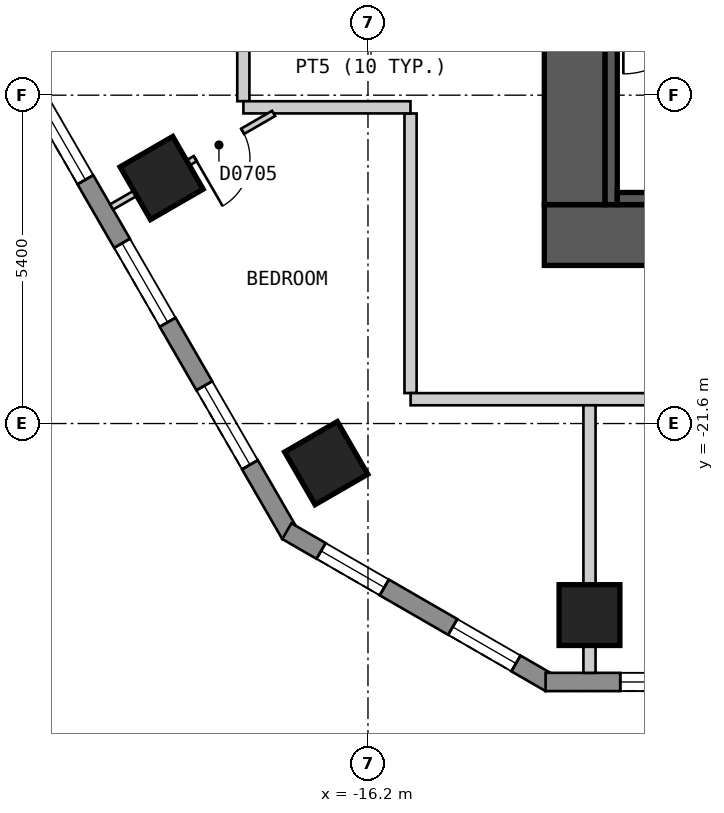
"""IFC4 building model, lengths in metres.
Left out: names, types, materials, properties, quantities, classifications, styles, units other than length and angle.
Written with IfcOpenShell. Run it as: python <this file> out.ifc"""

import sys

from ifc_helpers import new_model, si_unit, direction, frame, frame_2d, origin, origin_2d, place, context, subcontext, project, spatial, polyline, rectangle, outline, extrude, element, fill, save


model = new_model("IFC4")
c1 = context("Model", 3, precision=1e-05, world=origin(), true_north=direction((0.0, 1.0)))
c2 = subcontext(c1, "Body", "Model", "MODEL_VIEW")
j1 = project(units=[si_unit("LENGTHUNIT", "METRE"), si_unit("PLANEANGLEUNIT", "RADIAN")], contexts=[c1])
p1 = place(None, origin())
s1 = spatial("IfcSite", under=j1, at=p1, CompositionType="ELEMENT")
p2 = place(p1, origin())
s2 = spatial("IfcBuilding", under=s1, at=p2, CompositionType="ELEMENT")
p3 = place(p2, frame((0.0, 0.0, 105.0)))
s3 = spatial("IfcBuildingStorey", under=s2, at=p3, CompositionType="ELEMENT", Elevation=105.0)
for number, where, z_axis, x_axis in (
    (1, (-19.594, -17.563, 0.0), (0.0, 0.0, 1.0), (0.5, -0.866, 0.0)),
    (2, (-16.887, -22.251, 0.0), (0.0, 0.0, 1.0), (0.5, -0.866, 0.0)),
    (3, (-12.557, -24.75, 0.0), (0.0, 0.0, 1.0), (1.0, 0.0, 0.0)),
):
    element("IfcColumn", number, at=place(p3, frame(where, z_axis=z_axis, x_axis=x_axis)), inside=s3, PredefinedType="COLUMN", context=c2, shape_type="SweptSolid", body=[
        extrude(rectangle(XDim=1.0, YDim=1.0, at=origin_2d()), origin(), (0.0, 0.0, 1.0), 3.0),
    ])
p4 = place(p3, frame((-13.3, -18.5, 0.0), z_axis=(0.0, 0.0, 1.0), x_axis=(1.0, 0.0, 0.0)))
e4 = element("IfcWall", 4, at=p4, inside=s3, PredefinedType="SHEAR", context=c2, shape_type="SweptSolid", body=[
    extrude(rectangle(XDim=26.6, YDim=1.0, at=frame_2d((13.3, 0.0))), origin(), (0.0, 0.0, 1.0), 2.6),
])
p5 = place(p3, frame((-12.8, -18.0, 0.0), z_axis=(0.0, 0.0, 1.0), x_axis=(0.0, 1.0, 0.0)))
e5 = element("IfcWall", 5, at=p5, inside=s3, PredefinedType="SHEAR", context=c2, shape_type="SweptSolid", body=[
    extrude(rectangle(XDim=12.0, YDim=1.0, at=frame_2d((6.0, 0.0))), origin(), (0.0, 0.0, 1.0), 2.6),
])
p6 = place(p5, frame((3.8, 0.0, 0.0)))
e6 = element("IfcOpeningElement", 6, at=p6, cuts=e5, PredefinedType="OPENING", context=c2, shape_type="SweptSolid", body=[
    extrude(rectangle(XDim=1.2, YDim=2.1, at=frame_2d((0.6, 1.05))), frame((0.0, 0.51, 0.0), z_axis=(0.0, -1.0, 0.0), x_axis=(1.0, 0.0, 0.0)), (0.0, 0.0, 1.0), 1.02),
])
p7 = place(p3, frame((-29.027, -3.425, 0.0), z_axis=(0.0, 0.0, 1.0), x_axis=(0.500035407905, -0.866004960056, 0.0)))
e7 = element("IfcWall", 7, at=p7, inside=s3, PredefinedType="SOLIDWALL", context=c2, shape_type="SweptSolid", body=[
    extrude(outline(polyline([(0.0, -0.15), (23.094, -0.15), (23.014, 0.15), (0.08, 0.15), (0.0, -0.15)])), origin(), (0.0, 0.0, 1.0), 2.6),
])
p8 = place(p7, frame((1.324, 0.0, 0.15)))
e8 = element("IfcOpeningElement", 8, at=p8, cuts=e7, PredefinedType="OPENING", context=c2, shape_type="SweptSolid", body=[
    extrude(rectangle(XDim=1.5, YDim=2.1, at=frame_2d((0.75, 1.05))), frame((0.0, 0.16, 0.0), z_axis=(0.0, -1.0, 0.0), x_axis=(1.0, 0.0, 0.0)), (0.0, 0.0, 1.0), 0.32),
])
p9 = place(p7, frame((4.031, 0.0, 0.15)))
e9 = element("IfcOpeningElement", 9, at=p9, cuts=e7, PredefinedType="OPENING", context=c2, shape_type="SweptSolid", body=[
    extrude(rectangle(XDim=1.5, YDim=2.1, at=frame_2d((0.75, 1.05))), frame((0.0, 0.16, 0.0), z_axis=(0.0, -1.0, 0.0), x_axis=(1.0, 0.0, 0.0)), (0.0, 0.0, 1.0), 0.32),
])
p10 = place(p7, frame((6.737, 0.0, 0.15)))
e10 = element("IfcOpeningElement", 10, at=p10, cuts=e7, PredefinedType="OPENING", context=c2, shape_type="SweptSolid", body=[
    extrude(rectangle(XDim=1.5, YDim=2.1, at=frame_2d((0.75, 1.05))), frame((0.0, 0.16, 0.0), z_axis=(0.0, -1.0, 0.0), x_axis=(1.0, 0.0, 0.0)), (0.0, 0.0, 1.0), 0.32),
])
p11 = place(p7, frame((9.444, 0.0, 0.15)))
e11 = element("IfcOpeningElement", 11, at=p11, cuts=e7, PredefinedType="OPENING", context=c2, shape_type="SweptSolid", body=[
    extrude(rectangle(XDim=1.5, YDim=2.1, at=frame_2d((0.75, 1.05))), frame((0.0, 0.16, 0.0), z_axis=(0.0, -1.0, 0.0), x_axis=(1.0, 0.0, 0.0)), (0.0, 0.0, 1.0), 0.32),
])
p12 = place(p7, frame((12.151, 0.0, 0.15)))
e12 = element("IfcOpeningElement", 12, at=p12, cuts=e7, PredefinedType="OPENING", context=c2, shape_type="SweptSolid", body=[
    extrude(rectangle(XDim=1.5, YDim=2.1, at=frame_2d((0.75, 1.05))), frame((0.0, 0.16, 0.0), z_axis=(0.0, -1.0, 0.0), x_axis=(1.0, 0.0, 0.0)), (0.0, 0.0, 1.0), 0.32),
])
p13 = place(p7, frame((14.857, 0.0, 0.15)))
e13 = element("IfcOpeningElement", 13, at=p13, cuts=e7, PredefinedType="OPENING", context=c2, shape_type="SweptSolid", body=[
    extrude(rectangle(XDim=1.5, YDim=2.1, at=frame_2d((0.75, 1.05))), frame((0.0, 0.16, 0.0), z_axis=(0.0, -1.0, 0.0), x_axis=(1.0, 0.0, 0.0)), (0.0, 0.0, 1.0), 0.32),
])
p14 = place(p7, frame((17.564, 0.0, 0.15)))
e14 = element("IfcOpeningElement", 14, at=p14, cuts=e7, PredefinedType="OPENING", context=c2, shape_type="SweptSolid", body=[
    extrude(rectangle(XDim=1.5, YDim=2.1, at=frame_2d((0.75, 1.05))), frame((0.0, 0.16, 0.0), z_axis=(0.0, -1.0, 0.0), x_axis=(1.0, 0.0, 0.0)), (0.0, 0.0, 1.0), 0.32),
])
p15 = place(p7, frame((20.27, 0.0, 0.15)))
e15 = element("IfcOpeningElement", 15, at=p15, cuts=e7, PredefinedType="OPENING", context=c2, shape_type="SweptSolid", body=[
    extrude(rectangle(XDim=1.5, YDim=2.1, at=frame_2d((0.75, 1.05))), frame((0.0, 0.16, 0.0), z_axis=(0.0, -1.0, 0.0), x_axis=(1.0, 0.0, 0.0)), (0.0, 0.0, 1.0), 0.32),
])
p16 = place(p3, frame((-17.534, -23.37, 0.0), z_axis=(0.0, 0.0, 1.0), x_axis=(0.866010750942, -0.50002537861, 0.0)))
e16 = element("IfcWall", 16, at=p16, inside=s3, PredefinedType="SOLIDWALL", context=c2, shape_type="SweptSolid", body=[
    extrude(outline(polyline([(0.0, -0.15), (5.0, -0.15), (4.919, 0.15), (0.08, 0.15), (0.0, -0.15)])), origin(), (0.0, 0.0, 1.0), 2.6),
])
p17 = place(p16, frame((0.65, 0.0, 0.15)))
e17 = element("IfcOpeningElement", 17, at=p17, cuts=e16, PredefinedType="OPENING", context=c2, shape_type="SweptSolid", body=[
    extrude(rectangle(XDim=1.2, YDim=2.1, at=frame_2d((0.6, 1.05))), frame((0.0, 0.16, 0.0), z_axis=(0.0, -1.0, 0.0), x_axis=(1.0, 0.0, 0.0)), (0.0, 0.0, 1.0), 0.32),
])
p18 = place(p16, frame((3.15, 0.0, 0.15)))
e18 = element("IfcOpeningElement", 18, at=p18, cuts=e16, PredefinedType="OPENING", context=c2, shape_type="SweptSolid", body=[
    extrude(rectangle(XDim=1.2, YDim=2.1, at=frame_2d((0.6, 1.05))), frame((0.0, 0.16, 0.0), z_axis=(0.0, -1.0, 0.0), x_axis=(1.0, 0.0, 0.0)), (0.0, 0.0, 1.0), 0.32),
])
p19 = place(p3, frame((-13.279, -25.85, 0.0), z_axis=(0.0, 0.0, 1.0), x_axis=(1.0, 0.0, 0.0)))
e19 = element("IfcWall", 19, at=p19, inside=s3, PredefinedType="SOLIDWALL", context=c2, shape_type="SweptSolid", body=[
    extrude(outline(polyline([(0.0, -0.15), (26.558, -0.15), (26.478, 0.15), (0.08, 0.15), (0.0, -0.15)])), origin(), (0.0, 0.0, 1.0), 2.6),
])
p20 = place(p19, frame((1.228, 0.0, 0.15)))
e20 = element("IfcOpeningElement", 20, at=p20, cuts=e19, PredefinedType="OPENING", context=c2, shape_type="SweptSolid", body=[
    extrude(rectangle(XDim=1.5, YDim=2.1, at=frame_2d((0.75, 1.05))), frame((0.0, 0.16, 0.0), z_axis=(0.0, -1.0, 0.0), x_axis=(1.0, 0.0, 0.0)), (0.0, 0.0, 1.0), 0.32),
])
p21 = place(p19, frame((3.739, 0.0, 0.15)))
e21 = element("IfcOpeningElement", 21, at=p21, cuts=e19, PredefinedType="OPENING", context=c2, shape_type="SweptSolid", body=[
    extrude(rectangle(XDim=1.5, YDim=2.1, at=frame_2d((0.75, 1.05))), frame((0.0, 0.16, 0.0), z_axis=(0.0, -1.0, 0.0), x_axis=(1.0, 0.0, 0.0)), (0.0, 0.0, 1.0), 0.32),
])
p22 = place(p19, frame((6.251, 0.0, 0.15)))
e22 = element("IfcOpeningElement", 22, at=p22, cuts=e19, PredefinedType="OPENING", context=c2, shape_type="SweptSolid", body=[
    extrude(rectangle(XDim=1.5, YDim=2.1, at=frame_2d((0.75, 1.05))), frame((0.0, 0.16, 0.0), z_axis=(0.0, -1.0, 0.0), x_axis=(1.0, 0.0, 0.0)), (0.0, 0.0, 1.0), 0.32),
])
p23 = place(p19, frame((8.762, 0.0, 0.15)))
e23 = element("IfcOpeningElement", 23, at=p23, cuts=e19, PredefinedType="OPENING", context=c2, shape_type="SweptSolid", body=[
    extrude(rectangle(XDim=1.5, YDim=2.1, at=frame_2d((0.75, 1.05))), frame((0.0, 0.16, 0.0), z_axis=(0.0, -1.0, 0.0), x_axis=(1.0, 0.0, 0.0)), (0.0, 0.0, 1.0), 0.32),
])
p24 = place(p19, frame((11.274, 0.0, 0.15)))
e24 = element("IfcOpeningElement", 24, at=p24, cuts=e19, PredefinedType="OPENING", context=c2, shape_type="SweptSolid", body=[
    extrude(rectangle(XDim=1.5, YDim=2.1, at=frame_2d((0.75, 1.05))), frame((0.0, 0.16, 0.0), z_axis=(0.0, -1.0, 0.0), x_axis=(1.0, 0.0, 0.0)), (0.0, 0.0, 1.0), 0.32),
])
p25 = place(p19, frame((13.785, 0.0, 0.15)))
e25 = element("IfcOpeningElement", 25, at=p25, cuts=e19, PredefinedType="OPENING", context=c2, shape_type="SweptSolid", body=[
    extrude(rectangle(XDim=1.5, YDim=2.1, at=frame_2d((0.75, 1.05))), frame((0.0, 0.16, 0.0), z_axis=(0.0, -1.0, 0.0), x_axis=(1.0, 0.0, 0.0)), (0.0, 0.0, 1.0), 0.32),
])
p26 = place(p19, frame((16.297, 0.0, 0.15)))
e26 = element("IfcOpeningElement", 26, at=p26, cuts=e19, PredefinedType="OPENING", context=c2, shape_type="SweptSolid", body=[
    extrude(rectangle(XDim=1.5, YDim=2.1, at=frame_2d((0.75, 1.05))), frame((0.0, 0.16, 0.0), z_axis=(0.0, -1.0, 0.0), x_axis=(1.0, 0.0, 0.0)), (0.0, 0.0, 1.0), 0.32),
])
p27 = place(p19, frame((18.808, 0.0, 0.15)))
e27 = element("IfcOpeningElement", 27, at=p27, cuts=e19, PredefinedType="OPENING", context=c2, shape_type="SweptSolid", body=[
    extrude(rectangle(XDim=1.5, YDim=2.1, at=frame_2d((0.75, 1.05))), frame((0.0, 0.16, 0.0), z_axis=(0.0, -1.0, 0.0), x_axis=(1.0, 0.0, 0.0)), (0.0, 0.0, 1.0), 0.32),
])
p28 = place(p19, frame((21.32, 0.0, 0.15)))
e28 = element("IfcOpeningElement", 28, at=p28, cuts=e19, PredefinedType="OPENING", context=c2, shape_type="SweptSolid", body=[
    extrude(rectangle(XDim=1.5, YDim=2.1, at=frame_2d((0.75, 1.05))), frame((0.0, 0.16, 0.0), z_axis=(0.0, -1.0, 0.0), x_axis=(1.0, 0.0, 0.0)), (0.0, 0.0, 1.0), 0.32),
])
p29 = place(p19, frame((23.831, 0.0, 0.15)))
e29 = element("IfcOpeningElement", 29, at=p29, cuts=e19, PredefinedType="OPENING", context=c2, shape_type="SweptSolid", body=[
    extrude(rectangle(XDim=1.5, YDim=2.1, at=frame_2d((0.75, 1.05))), frame((0.0, 0.16, 0.0), z_axis=(0.0, -1.0, 0.0), x_axis=(1.0, 0.0, 0.0)), (0.0, 0.0, 1.0), 0.32),
])
p30 = place(p3, frame((-15.5, -16.501, 0.0), z_axis=(0.0, 0.0, 1.0), x_axis=(0.0, -1.0, 0.0)))
e30 = element("IfcWall", 30, at=p30, inside=s3, PredefinedType="PARTITIONING", context=c2, shape_type="SweptSolid", body=[
    extrude(rectangle(XDim=4.598, YDim=0.2, at=frame_2d((2.299, 0.0))), origin(), (0.0, 0.0, 1.0), 2.6),
])
p31 = place(p3, frame((-18.25, -10.594, 0.0), z_axis=(0.0, 0.0, 1.0), x_axis=(0.0, -1.0, 0.0)))
e31 = element("IfcWall", 31, at=p31, inside=s3, PredefinedType="PARTITIONING", context=c2, shape_type="SweptSolid", body=[
    extrude(rectangle(XDim=5.705, YDim=0.2, at=frame_2d((2.853, 0.0))), origin(), (0.0, 0.0, 1.0), 2.6),
])
p32 = place(p3, frame((-18.249, -16.4, 0.0), z_axis=(0.0, 0.0, 1.0), x_axis=(1.0, 0.0, 0.0)))
e32 = element("IfcWall", 32, at=p32, inside=s3, PredefinedType="PARTITIONING", context=c2, shape_type="SweptSolid", body=[
    extrude(rectangle(XDim=2.748, YDim=0.2, at=frame_2d((1.374, 0.0))), origin(), (0.0, 0.0, 1.0), 2.6),
])
p33 = place(p3, frame((-15.499, -21.2, 0.0), z_axis=(0.0, 0.0, 1.0), x_axis=(1.0, 0.0, 0.0)))
e33 = element("IfcWall", 33, at=p33, inside=s3, PredefinedType="PARTITIONING", context=c2, shape_type="SweptSolid", body=[
    extrude(rectangle(XDim=30.898, YDim=0.2, at=frame_2d((15.449, 0.0))), origin(), (0.0, 0.0, 1.0), 2.6),
])
p34 = place(p33, frame((9.977, 0.0, 0.0)))
e34 = element("IfcOpeningElement", 34, at=p34, cuts=e33, PredefinedType="OPENING", context=c2, shape_type="SweptSolid", body=[
    extrude(rectangle(XDim=1.0, YDim=2.1, at=frame_2d((0.5, 1.05))), frame((0.0, 0.11, 0.0), z_axis=(0.0, -1.0, 0.0), x_axis=(1.0, 0.0, 0.0)), (0.0, 0.0, 1.0), 0.22),
])
p35 = place(p33, frame((25.046, 0.0, 0.0)))
e35 = element("IfcOpeningElement", 35, at=p35, cuts=e33, PredefinedType="OPENING", context=c2, shape_type="SweptSolid", body=[
    extrude(rectangle(XDim=1.0, YDim=2.1, at=frame_2d((0.5, 1.05))), frame((0.0, 0.11, 0.0), z_axis=(0.0, -1.0, 0.0), x_axis=(1.0, 0.0, 0.0)), (0.0, 0.0, 1.0), 0.22),
])
p36 = place(p3, frame((-20.416, -18.038, 0.0), z_axis=(0.0, 0.0, 1.0), x_axis=(0.866026989333, 0.499997253739, 0.0)))
e36 = element("IfcWall", 36, at=p36, inside=s3, PredefinedType="PARTITIONING", context=c2, shape_type="SweptSolid", body=[
    extrude(rectangle(XDim=3.076, YDim=0.1, at=frame_2d((1.538, 0.0))), origin(), (0.0, 0.0, 1.0), 2.6),
])
p37 = place(p36, frame((1.588, 0.0, 0.0)))
e37 = element("IfcOpeningElement", 37, at=p37, cuts=e36, PredefinedType="OPENING", context=c2, shape_type="SweptSolid", body=[
    extrude(rectangle(XDim=0.9, YDim=2.1, at=frame_2d((0.45, 1.05))), frame((0.0, 0.06, 0.0), z_axis=(0.0, -1.0, 0.0), x_axis=(1.0, 0.0, 0.0)), (0.0, 0.0, 1.0), 0.12),
])
p38 = place(p3, frame((-12.557, -25.7, 0.0), z_axis=(0.0, 0.0, 1.0), x_axis=(0.0, 1.0, 0.0)))
e38 = element("IfcWall", 38, at=p38, inside=s3, PredefinedType="PARTITIONING", context=c2, shape_type="SweptSolid", body=[
    extrude(rectangle(XDim=4.4, YDim=0.2, at=frame_2d((2.2, 0.0))), origin(), (0.0, 0.0, 1.0), 2.6),
])
p39 = place(p3, frame((-12.2, -18.0, 0.0), z_axis=(0.0, 0.0, 1.0), x_axis=(0.0, 1.0, 0.0)))
e39 = element("IfcWall", 39, at=p39, inside=s3, PredefinedType="SOLIDWALL", context=c2, shape_type="SweptSolid", body=[
    extrude(rectangle(XDim=3.15, YDim=0.2, at=frame_2d((1.575, 0.0))), origin(), (0.0, 0.0, 1.0), 2.6),
])
p40 = place(p3, frame((-12.1, -17.9, 0.0), z_axis=(0.0, 0.0, 1.0), x_axis=(1.0, 0.0, 0.0)))
e40 = element("IfcWall", 40, at=p40, inside=s3, PredefinedType="SOLIDWALL", context=c2, shape_type="SweptSolid", body=[
    extrude(rectangle(XDim=5.4, YDim=0.2, at=frame_2d((2.7, 0.0))), origin(), (0.0, 0.0, 1.0), 2.6),
])
p41 = place(p13, origin())
e41 = element("IfcWindow", 41, at=p41, inside=s3, PartitioningType="SINGLE_PANEL", PredefinedType="WINDOW", context=c2, shape_type="SweptSolid", body=[
    extrude(rectangle(XDim=1.5, YDim=2.1, at=frame_2d((0.75, 1.05))), frame((0.0, 0.03, 0.0), z_axis=(0.0, -1.0, 0.0), x_axis=(1.0, 0.0, 0.0)), (0.0, 0.0, 1.0), 0.06),
])
fill(e13, e41)
p42 = place(p14, origin())
e42 = element("IfcWindow", 42, at=p42, inside=s3, PartitioningType="SINGLE_PANEL", PredefinedType="WINDOW", context=c2, shape_type="SweptSolid", body=[
    extrude(rectangle(XDim=1.5, YDim=2.1, at=frame_2d((0.75, 1.05))), frame((0.0, 0.03, 0.0), z_axis=(0.0, -1.0, 0.0), x_axis=(1.0, 0.0, 0.0)), (0.0, 0.0, 1.0), 0.06),
])
fill(e14, e42)
p43 = place(p15, origin())
e43 = element("IfcWindow", 43, at=p43, inside=s3, PartitioningType="SINGLE_PANEL", PredefinedType="WINDOW", context=c2, shape_type="SweptSolid", body=[
    extrude(rectangle(XDim=1.5, YDim=2.1, at=frame_2d((0.75, 1.05))), frame((0.0, 0.03, 0.0), z_axis=(0.0, -1.0, 0.0), x_axis=(1.0, 0.0, 0.0)), (0.0, 0.0, 1.0), 0.06),
])
fill(e15, e43)
p44 = place(p17, origin())
e44 = element("IfcWindow", 44, at=p44, inside=s3, PartitioningType="SINGLE_PANEL", PredefinedType="WINDOW", context=c2, shape_type="SweptSolid", body=[
    extrude(rectangle(XDim=1.2, YDim=2.1, at=frame_2d((0.6, 1.05))), frame((0.0, 0.03, 0.0), z_axis=(0.0, -1.0, 0.0), x_axis=(1.0, 0.0, 0.0)), (0.0, 0.0, 1.0), 0.06),
])
fill(e17, e44)
p45 = place(p18, origin())
e45 = element("IfcWindow", 45, at=p45, inside=s3, PartitioningType="SINGLE_PANEL", PredefinedType="WINDOW", context=c2, shape_type="SweptSolid", body=[
    extrude(rectangle(XDim=1.2, YDim=2.1, at=frame_2d((0.6, 1.05))), frame((0.0, 0.03, 0.0), z_axis=(0.0, -1.0, 0.0), x_axis=(1.0, 0.0, 0.0)), (0.0, 0.0, 1.0), 0.06),
])
fill(e18, e45)
p46 = place(p20, origin())
e46 = element("IfcWindow", 46, at=p46, inside=s3, PartitioningType="SINGLE_PANEL", PredefinedType="WINDOW", context=c2, shape_type="SweptSolid", body=[
    extrude(rectangle(XDim=1.5, YDim=2.1, at=frame_2d((0.75, 1.05))), frame((0.0, 0.03, 0.0), z_axis=(0.0, -1.0, 0.0), x_axis=(1.0, 0.0, 0.0)), (0.0, 0.0, 1.0), 0.06),
])
fill(e20, e46)
p47 = place(p37, origin())
e47 = element("IfcDoor", 47, at=p47, inside=s3, OperationType="SINGLE_SWING_LEFT", PredefinedType="DOOR", context=c2, shape_type="SweptSolid", body=[
    extrude(rectangle(XDim=0.9, YDim=2.1, at=frame_2d((0.45, 1.05))), frame((0.0, 0.025, 0.0), z_axis=(0.0, -1.0, 0.0), x_axis=(1.0, 0.0, 0.0)), (0.0, 0.0, 1.0), 0.05),
])
fill(e37, e47)
save(model, sys.argv[1])
